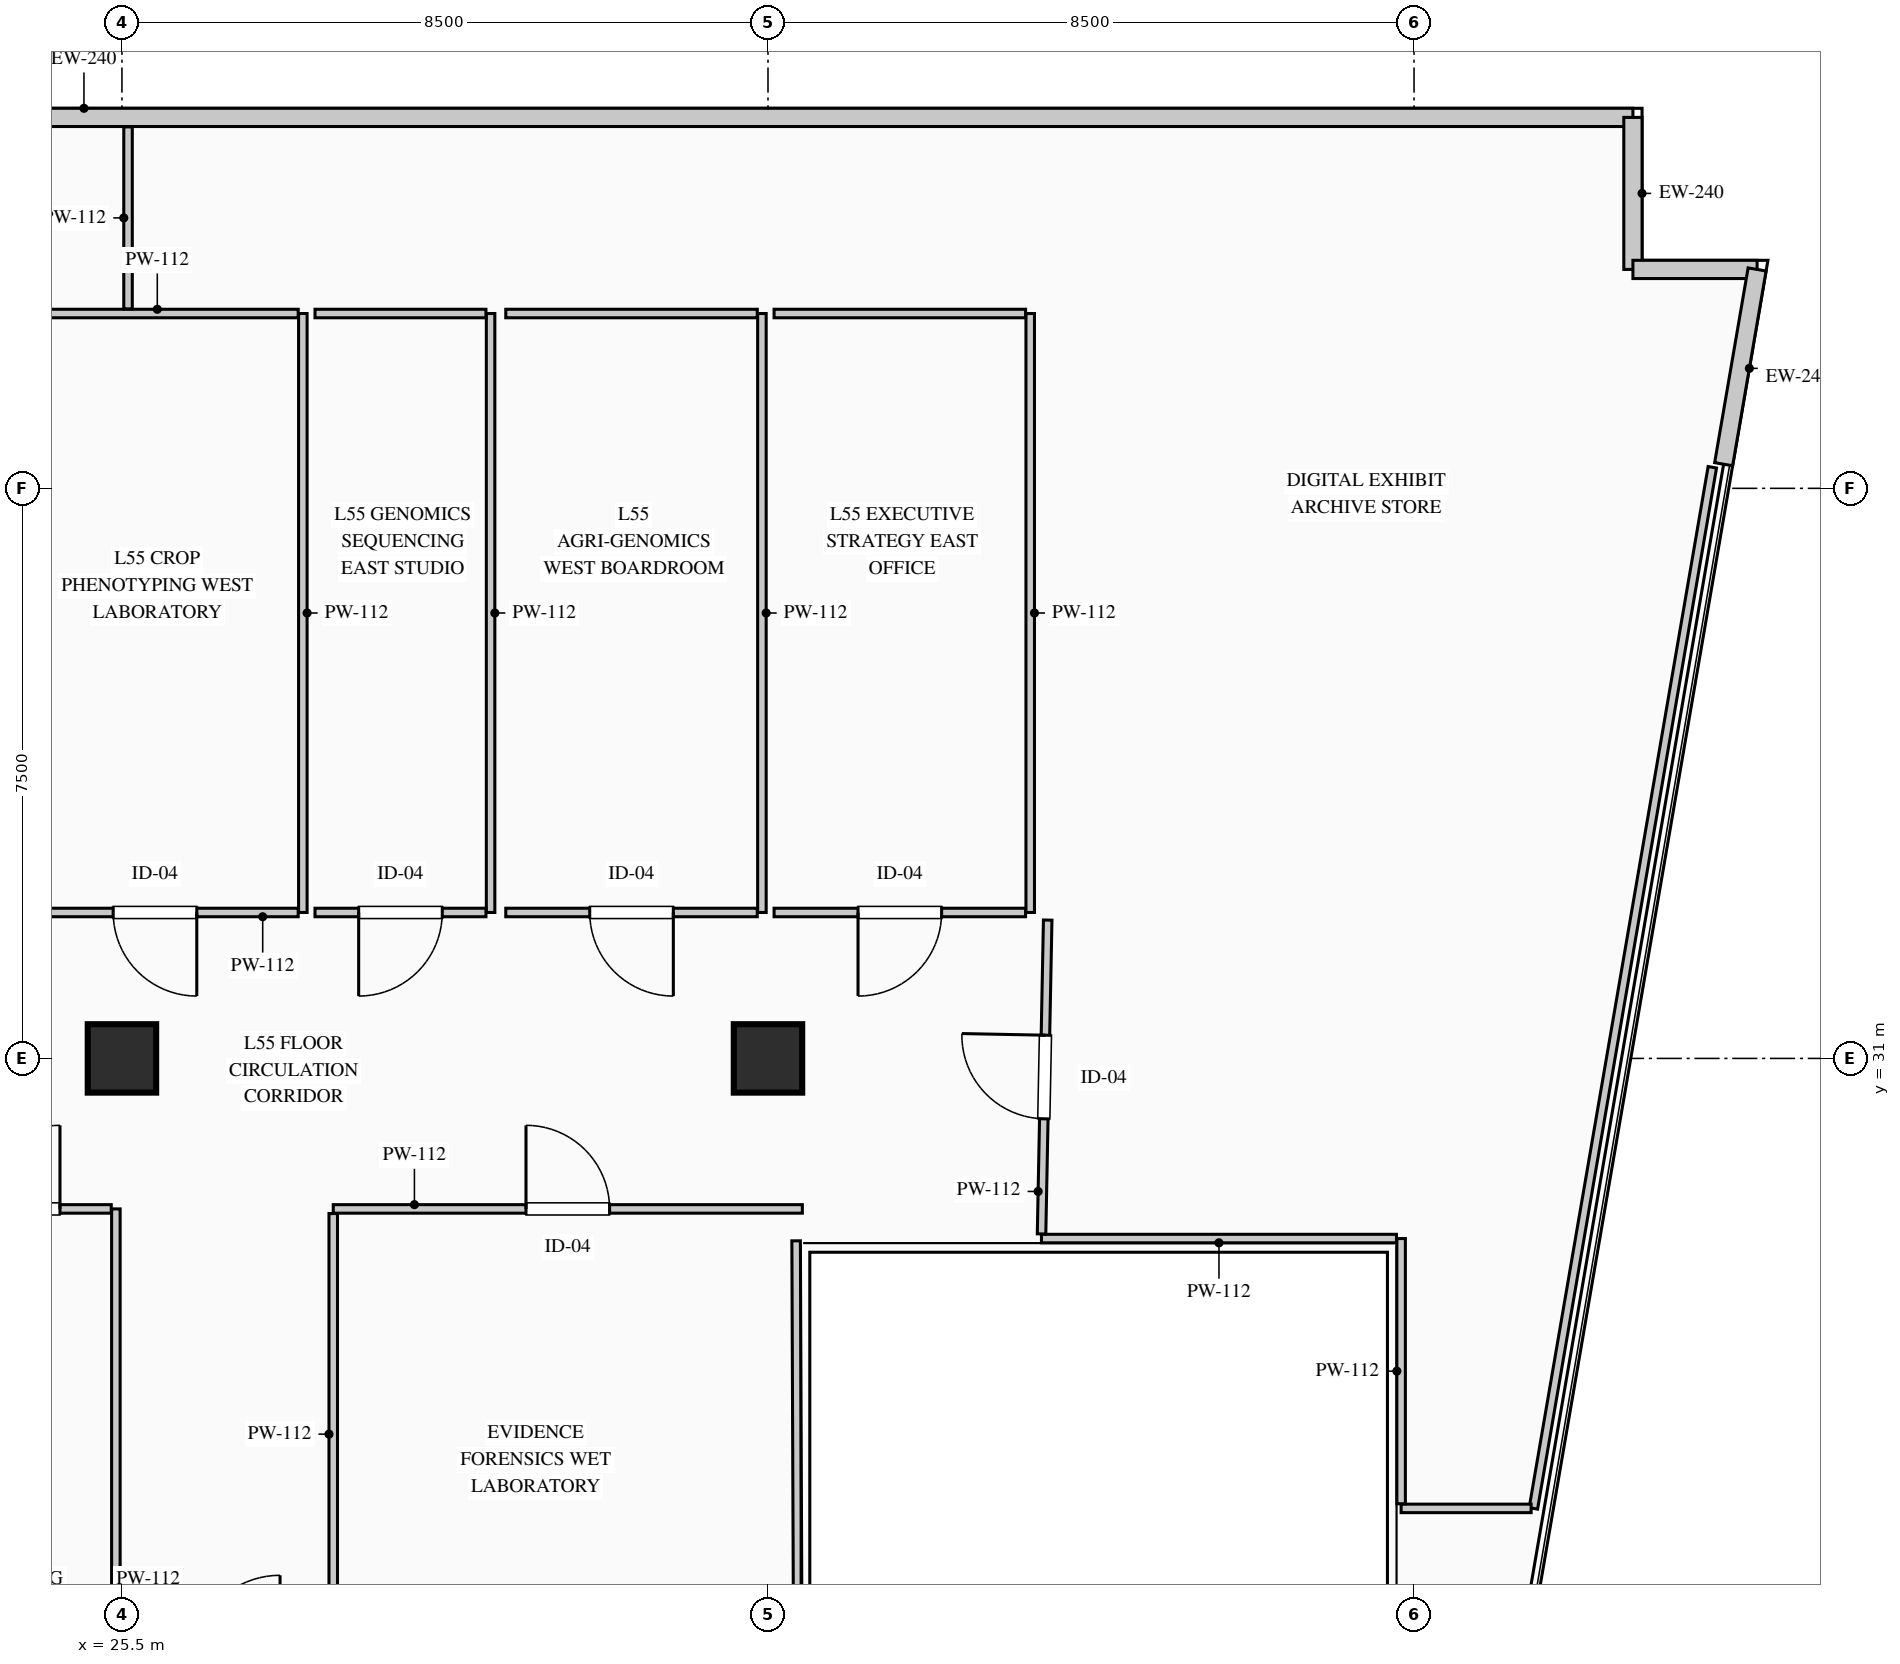
"""IFC4 building model, lengths in metres.
Left out: names, types, materials, properties, quantities, classifications, styles, units other than length and angle.
Written with IfcOpenShell. Run it as: python <this file> out.ifc"""

import sys

from ifc_helpers import new_model, si_unit, direction, frame, frame_2d, origin, origin_2d, place, context, subcontext, project, spatial, rectangle, extrude, element, fill, save


model = new_model("IFC4")
c1 = context("Model", 3, precision=1e-05, world=origin(), true_north=direction((0.0, 1.0)))
c2 = subcontext(c1, "Body", "Model", "MODEL_VIEW")
j1 = project(units=[si_unit("LENGTHUNIT", "METRE"), si_unit("PLANEANGLEUNIT", "RADIAN")], contexts=[c1])
p1 = place(None, origin())
s1 = spatial("IfcSite", under=j1, at=p1, CompositionType="ELEMENT")
p2 = place(p1, origin())
s2 = spatial("IfcBuilding", under=s1, at=p2, CompositionType="ELEMENT")
p3 = place(p2, frame((0.0, 0.0, 231.15)))
s3 = spatial("IfcBuildingStorey", under=s2, at=p3, CompositionType="ELEMENT", Elevation=231.15)
for number, where, z_axis, x_axis in (
    (1, (25.5, 31.0, 0.0), (0.0, 0.0, 1.0), (1.0, 0.0, 0.0)),
    (2, (34.0, 31.0, 0.0), (0.0, 0.0, 1.0), (1.0, 0.0, 0.0)),
):
    element("IfcColumn", number, at=place(p3, frame(where, z_axis=z_axis, x_axis=x_axis)), inside=s3, PredefinedType="COLUMN", context=c2, shape_type="SweptSolid", body=[
        extrude(rectangle(XDim=0.9, YDim=0.9, at=origin_2d()), origin(), (0.0, 0.0, 1.0), 3.95),
    ])
p4 = place(p3, frame((4.62, 43.38, 0.0), z_axis=(0.0, 0.0, 1.0), x_axis=(1.0, 0.0, 0.0)))
e3 = element("IfcWall", 3, at=p4, inside=s3, PredefinedType="STANDARD", context=c2, shape_type="SweptSolid", body=[
    extrude(rectangle(XDim=40.76, YDim=0.24, at=frame_2d((20.38, 0.0))), origin(), (0.0, 0.0, 1.0), 3.7),
])
p5 = place(p4, frame((13.324, 0.0, 0.9)))
e4 = element("IfcOpeningElement", 4, at=p5, cuts=e3, PredefinedType="OPENING", context=c2, shape_type="SweptSolid", body=[
    extrude(rectangle(XDim=2.7, YDim=2.1, at=frame_2d((1.35, 1.05))), frame((0.0, 0.13, 0.0), z_axis=(0.0, -1.0, 0.0), x_axis=(1.0, 0.0, 0.0)), (0.0, 0.0, 1.0), 0.26),
])
p6 = place(p3, frame((45.38, 43.38, 0.0), z_axis=(0.0, 0.0, 1.0), x_axis=(0.0, -1.0, 0.0)))
e5 = element("IfcWall", 5, at=p6, inside=s3, PredefinedType="STANDARD", context=c2, shape_type="SweptSolid", body=[
    extrude(rectangle(XDim=2.0, YDim=0.24, at=frame_2d((1.0, 0.0))), origin(), (0.0, 0.0, 1.0), 3.7),
])
p7 = place(p3, frame((45.38, 41.38, 0.0), z_axis=(0.0, 0.0, 1.0), x_axis=(1.0, 0.0, 0.0)))
e6 = element("IfcWall", 6, at=p7, inside=s3, PredefinedType="STANDARD", context=c2, shape_type="SweptSolid", body=[
    extrude(rectangle(XDim=1.634, YDim=0.24, at=frame_2d((0.817, 0.0))), origin(), (0.0, 0.0, 1.0), 3.7),
])
p8 = place(p3, frame((47.014, 41.38, 0.0), z_axis=(0.0, 0.0, 1.0), x_axis=(-0.169406892601, -0.985546196147, 0.0)))
e7 = element("IfcWall", 7, at=p8, inside=s3, PredefinedType="STANDARD", context=c2, shape_type="SweptSolid", body=[
    extrude(rectangle(XDim=2.6, YDim=0.24, at=frame_2d((1.3, 0.0))), origin(), (0.0, 0.0, 1.0), 3.7),
])
p9 = place(p3, frame((27.88, 40.8, 0.0), z_axis=(0.0, 0.0, 1.0), x_axis=(0.0, -1.0, 0.0)))
e8 = element("IfcWall", 8, at=p9, inside=s3, PredefinedType="PARTITIONING", context=c2, shape_type="SweptSolid", body=[
    extrude(rectangle(XDim=7.88, YDim=0.112, at=frame_2d((3.94, 0.0))), origin(), (0.0, 0.0, 1.0), 3.7),
])
p10 = place(p3, frame((27.819, 32.92, 0.0), z_axis=(0.0, 0.0, 1.0), x_axis=(-1.0, 0.0, 0.0)))
e9 = element("IfcWall", 9, at=p10, inside=s3, PredefinedType="PARTITIONING", context=c2, shape_type="SweptSolid", body=[
    extrude(rectangle(XDim=3.769, YDim=0.112, at=frame_2d((1.885, 0.0))), origin(), (0.0, 0.0, 1.0), 3.7),
])
p11 = place(p10, frame((1.334, 0.0, 0.0)))
e10 = element("IfcOpeningElement", 10, at=p11, cuts=e9, PredefinedType="OPENING", context=c2, shape_type="SweptSolid", body=[
    extrude(rectangle(XDim=1.1, YDim=2.2, at=frame_2d((0.55, 1.1))), frame((0.0, 0.066, 0.0), z_axis=(0.0, -1.0, 0.0), x_axis=(1.0, 0.0, 0.0)), (0.0, 0.0, 1.0), 0.132),
])
p12 = place(p3, frame((24.111, 40.8, 0.0), z_axis=(0.0, 0.0, 1.0), x_axis=(1.0, 0.0, 0.0)))
e11 = element("IfcWall", 11, at=p12, inside=s3, PredefinedType="PARTITIONING", context=c2, shape_type="SweptSolid", body=[
    extrude(rectangle(XDim=3.708, YDim=0.112, at=frame_2d((1.854, 0.0))), origin(), (0.0, 0.0, 1.0), 3.7),
])
p13 = place(p3, frame((30.35, 40.8, 0.0), z_axis=(0.0, 0.0, 1.0), x_axis=(0.0, -1.0, 0.0)))
e12 = element("IfcWall", 12, at=p13, inside=s3, PredefinedType="PARTITIONING", context=c2, shape_type="SweptSolid", body=[
    extrude(rectangle(XDim=7.88, YDim=0.112, at=frame_2d((3.94, 0.0))), origin(), (0.0, 0.0, 1.0), 3.7),
])
p14 = place(p3, frame((30.289, 32.92, 0.0), z_axis=(0.0, 0.0, 1.0), x_axis=(-1.0, 0.0, 0.0)))
e13 = element("IfcWall", 13, at=p14, inside=s3, PredefinedType="PARTITIONING", context=c2, shape_type="SweptSolid", body=[
    extrude(rectangle(XDim=2.249, YDim=0.112, at=frame_2d((1.125, 0.0))), origin(), (0.0, 0.0, 1.0), 3.7),
])
p15 = place(p14, frame((0.574, 0.0, 0.0)))
e14 = element("IfcOpeningElement", 14, at=p15, cuts=e13, PredefinedType="OPENING", context=c2, shape_type="SweptSolid", body=[
    extrude(rectangle(XDim=1.1, YDim=2.2, at=frame_2d((0.55, 1.1))), frame((0.0, 0.066, 0.0), z_axis=(0.0, -1.0, 0.0), x_axis=(1.0, 0.0, 0.0)), (0.0, 0.0, 1.0), 0.132),
])
p16 = place(p3, frame((28.04, 40.8, 0.0), z_axis=(0.0, 0.0, 1.0), x_axis=(1.0, 0.0, 0.0)))
e15 = element("IfcWall", 15, at=p16, inside=s3, PredefinedType="PARTITIONING", context=c2, shape_type="SweptSolid", body=[
    extrude(rectangle(XDim=2.249, YDim=0.112, at=frame_2d((1.125, 0.0))), origin(), (0.0, 0.0, 1.0), 3.7),
])
p17 = place(p3, frame((33.92, 40.8, 0.0), z_axis=(0.0, 0.0, 1.0), x_axis=(0.0, -1.0, 0.0)))
e16 = element("IfcWall", 16, at=p17, inside=s3, PredefinedType="PARTITIONING", context=c2, shape_type="SweptSolid", body=[
    extrude(rectangle(XDim=7.88, YDim=0.112, at=frame_2d((3.94, 0.0))), origin(), (0.0, 0.0, 1.0), 3.7),
])
p18 = place(p3, frame((33.859, 32.92, 0.0), z_axis=(0.0, 0.0, 1.0), x_axis=(-1.0, 0.0, 0.0)))
e17 = element("IfcWall", 17, at=p18, inside=s3, PredefinedType="PARTITIONING", context=c2, shape_type="SweptSolid", body=[
    extrude(rectangle(XDim=3.309, YDim=0.112, at=frame_2d((1.654, 0.0))), origin(), (0.0, 0.0, 1.0), 3.7),
])
p19 = place(p18, frame((1.104, 0.0, 0.0)))
e18 = element("IfcOpeningElement", 18, at=p19, cuts=e17, PredefinedType="OPENING", context=c2, shape_type="SweptSolid", body=[
    extrude(rectangle(XDim=1.1, YDim=2.2, at=frame_2d((0.55, 1.1))), frame((0.0, 0.066, 0.0), z_axis=(0.0, -1.0, 0.0), x_axis=(1.0, 0.0, 0.0)), (0.0, 0.0, 1.0), 0.132),
])
p20 = place(p3, frame((30.55, 40.8, 0.0), z_axis=(0.0, 0.0, 1.0), x_axis=(1.0, 0.0, 0.0)))
e19 = element("IfcWall", 19, at=p20, inside=s3, PredefinedType="PARTITIONING", context=c2, shape_type="SweptSolid", body=[
    extrude(rectangle(XDim=3.309, YDim=0.112, at=frame_2d((1.654, 0.0))), origin(), (0.0, 0.0, 1.0), 3.7),
])
p21 = place(p3, frame((37.45, 40.8, 0.0), z_axis=(0.0, 0.0, 1.0), x_axis=(0.0, -1.0, 0.0)))
e20 = element("IfcWall", 20, at=p21, inside=s3, PredefinedType="PARTITIONING", context=c2, shape_type="SweptSolid", body=[
    extrude(rectangle(XDim=7.88, YDim=0.112, at=frame_2d((3.94, 0.0))), origin(), (0.0, 0.0, 1.0), 3.7),
])
p22 = place(p3, frame((37.389, 32.92, 0.0), z_axis=(0.0, 0.0, 1.0), x_axis=(-1.0, 0.0, 0.0)))
e21 = element("IfcWall", 21, at=p22, inside=s3, PredefinedType="PARTITIONING", context=c2, shape_type="SweptSolid", body=[
    extrude(rectangle(XDim=3.309, YDim=0.112, at=frame_2d((1.654, 0.0))), origin(), (0.0, 0.0, 1.0), 3.7),
])
p23 = place(p22, frame((1.104, 0.0, 0.0)))
e22 = element("IfcOpeningElement", 22, at=p23, cuts=e21, PredefinedType="OPENING", context=c2, shape_type="SweptSolid", body=[
    extrude(rectangle(XDim=1.1, YDim=2.2, at=frame_2d((0.55, 1.1))), frame((0.0, 0.066, 0.0), z_axis=(0.0, -1.0, 0.0), x_axis=(1.0, 0.0, 0.0)), (0.0, 0.0, 1.0), 0.132),
])
p24 = place(p3, frame((34.08, 40.8, 0.0), z_axis=(0.0, 0.0, 1.0), x_axis=(1.0, 0.0, 0.0)))
e23 = element("IfcWall", 23, at=p24, inside=s3, PredefinedType="PARTITIONING", context=c2, shape_type="SweptSolid", body=[
    extrude(rectangle(XDim=3.309, YDim=0.112, at=frame_2d((1.654, 0.0))), origin(), (0.0, 0.0, 1.0), 3.7),
])
p25 = place(p3, frame((25.42, 29.02, 0.0), z_axis=(0.0, 0.0, 1.0), x_axis=(0.0, -1.0, 0.0)))
e24 = element("IfcWall", 24, at=p25, inside=s3, PredefinedType="PARTITIONING", context=c2, shape_type="SweptSolid", body=[
    extrude(rectangle(XDim=9.74, YDim=0.112, at=frame_2d((4.87, 0.0))), origin(), (0.0, 0.0, 1.0), 2.885),
])
p26 = place(p3, frame((22.91, 29.02, 0.0), z_axis=(0.0, 0.0, 1.0), x_axis=(1.0, 0.0, 0.0)))
e25 = element("IfcWall", 25, at=p26, inside=s3, PredefinedType="PARTITIONING", context=c2, shape_type="SweptSolid", body=[
    extrude(rectangle(XDim=2.449, YDim=0.112, at=frame_2d((1.225, 0.0))), origin(), (0.0, 0.0, 1.0), 3.7),
])
p27 = place(p26, frame((0.675, 0.0, 0.0)))
e26 = element("IfcOpeningElement", 26, at=p27, cuts=e25, PredefinedType="OPENING", context=c2, shape_type="SweptSolid", body=[
    extrude(rectangle(XDim=1.1, YDim=2.2, at=frame_2d((0.55, 1.1))), frame((0.0, 0.066, 0.0), z_axis=(0.0, -1.0, 0.0), x_axis=(1.0, 0.0, 0.0)), (0.0, 0.0, 1.0), 0.132),
])
p28 = place(p3, frame((28.28, 29.02, 0.0), z_axis=(0.0, 0.0, 1.0), x_axis=(1.0, 0.0, 0.0)))
e27 = element("IfcWall", 27, at=p28, inside=s3, PredefinedType="PARTITIONING", context=c2, shape_type="SweptSolid", body=[
    extrude(rectangle(XDim=6.172, YDim=0.112, at=frame_2d((3.086, 0.0))), origin(), (0.0, 0.0, 1.0), 3.485),
])
p29 = place(p28, frame((2.536, 0.0, 0.0)))
e28 = element("IfcOpeningElement", 28, at=p29, cuts=e27, PredefinedType="OPENING", context=c2, shape_type="SweptSolid", body=[
    extrude(rectangle(XDim=1.1, YDim=2.2, at=frame_2d((0.55, 1.1))), frame((0.0, 0.066, 0.0), z_axis=(0.0, -1.0, 0.0), x_axis=(1.0, 0.0, 0.0)), (0.0, 0.0, 1.0), 0.132),
])
p30 = place(p3, frame((34.37, 28.6, 0.0), z_axis=(0.0, 0.0, 1.0), x_axis=(0.004060215387, -0.999991757292, 0.0)))
e29 = element("IfcWall", 29, at=p30, inside=s3, PredefinedType="PARTITIONING", context=c2, shape_type="SweptSolid", body=[
    extrude(rectangle(XDim=9.32, YDim=0.112, at=frame_2d((4.66, 0.0))), origin(), (0.0, 0.0, 1.0), 3.7),
])
p31 = place(p3, frame((28.28, 23.155, 0.0), z_axis=(0.0, 0.0, 1.0), x_axis=(0.0, 1.0, 0.0)))
e30 = element("IfcWall", 30, at=p31, inside=s3, PredefinedType="PARTITIONING", context=c2, shape_type="SweptSolid", body=[
    extrude(rectangle(XDim=5.804, YDim=0.112, at=frame_2d((2.902, 0.0))), origin(), (0.0, 0.0, 1.0), 3.7),
])
p32 = place(p3, frame((46.425, 38.777, 0.0), z_axis=(0.0, 0.0, 1.0), x_axis=(-0.169413343695, -0.985545087238, 0.0)))
e31 = element("IfcWall", 31, at=p32, inside=s3, PredefinedType="PARTITIONING", context=c2, shape_type="SweptSolid", body=[
    extrude(rectangle(XDim=13.898, YDim=0.112, at=frame_2d((6.949, 0.0))), origin(), (0.0, 0.0, 1.0), 3.7),
])
p33 = place(p3, frame((44.041, 25.08, 0.0), z_axis=(0.0, 0.0, 1.0), x_axis=(-1.0, 0.0, 0.0)))
e32 = element("IfcWall", 32, at=p33, inside=s3, PredefinedType="PARTITIONING", context=c2, shape_type="SweptSolid", body=[
    extrude(rectangle(XDim=1.71, YDim=0.112, at=frame_2d((0.855, 0.0))), origin(), (0.0, 0.0, 1.0), 3.7),
])
p34 = place(p3, frame((42.33, 25.141, 0.0), z_axis=(0.0, 0.0, 1.0), x_axis=(0.0, 1.0, 0.0)))
e33 = element("IfcWall", 33, at=p34, inside=s3, PredefinedType="PARTITIONING", context=c2, shape_type="SweptSolid", body=[
    extrude(rectangle(XDim=3.489, YDim=0.112, at=frame_2d((1.744, 0.0))), origin(), (0.0, 0.0, 1.0), 3.7),
])
p35 = place(p3, frame((42.269, 28.63, 0.0), z_axis=(0.0, 0.0, 1.0), x_axis=(-1.0, 0.0, 0.0)))
e34 = element("IfcWall", 34, at=p35, inside=s3, PredefinedType="PARTITIONING", context=c2, shape_type="SweptSolid", body=[
    extrude(rectangle(XDim=4.671, YDim=0.112, at=frame_2d((2.335, 0.0))), origin(), (0.0, 0.0, 1.0), 3.7),
])
p36 = place(p3, frame((37.599, 28.691, 0.0), z_axis=(0.0, 0.0, 1.0), x_axis=(0.019566997539, 0.999808547977, 0.0)))
e35 = element("IfcWall", 35, at=p36, inside=s3, PredefinedType="PARTITIONING", context=c2, shape_type="SweptSolid", body=[
    extrude(rectangle(XDim=4.13, YDim=0.112, at=frame_2d((2.065, 0.0))), origin(), (0.0, 0.0, 1.0), 3.7),
])
p37 = place(p36, frame((1.515, 0.0, 0.0)))
e36 = element("IfcOpeningElement", 36, at=p37, cuts=e35, PredefinedType="OPENING", context=c2, shape_type="SweptSolid", body=[
    extrude(rectangle(XDim=1.1, YDim=2.2, at=frame_2d((0.55, 1.1))), frame((0.0, 0.066, 0.0), z_axis=(0.0, -1.0, 0.0), x_axis=(1.0, 0.0, 0.0)), (0.0, 0.0, 1.0), 0.132),
])
p38 = place(p3, frame((25.58, 40.861, 0.0), z_axis=(0.0, 0.0, 1.0), x_axis=(0.0, 1.0, 0.0)))
e37 = element("IfcWall", 37, at=p38, inside=s3, PredefinedType="PARTITIONING", context=c2, shape_type="SweptSolid", body=[
    extrude(rectangle(XDim=2.394, YDim=0.112, at=frame_2d((1.197, 0.0))), origin(), (0.0, 0.0, 1.0), 3.7),
])
p39 = place(p11, origin())
e38 = element("IfcDoor", 38, at=p39, inside=s3, OperationType="SINGLE_SWING_LEFT", PredefinedType="DOOR", context=c2, shape_type="SweptSolid", body=[
    extrude(rectangle(XDim=1.1, YDim=2.2, at=frame_2d((0.55, 1.1))), frame((0.0, 0.025, 0.0), z_axis=(0.0, -1.0, 0.0), x_axis=(1.0, 0.0, 0.0)), (0.0, 0.0, 1.0), 0.05),
])
fill(e10, e38)
p40 = place(p15, origin())
e39 = element("IfcDoor", 39, at=p40, inside=s3, OperationType="SINGLE_SWING_RIGHT", PredefinedType="DOOR", context=c2, shape_type="SweptSolid", body=[
    extrude(rectangle(XDim=1.1, YDim=2.2, at=frame_2d((0.55, 1.1))), frame((0.0, 0.025, 0.0), z_axis=(0.0, -1.0, 0.0), x_axis=(1.0, 0.0, 0.0)), (0.0, 0.0, 1.0), 0.05),
])
fill(e14, e39)
p41 = place(p19, origin())
e40 = element("IfcDoor", 40, at=p41, inside=s3, OperationType="SINGLE_SWING_LEFT", PredefinedType="DOOR", context=c2, shape_type="SweptSolid", body=[
    extrude(rectangle(XDim=1.1, YDim=2.2, at=frame_2d((0.55, 1.1))), frame((0.0, 0.025, 0.0), z_axis=(0.0, -1.0, 0.0), x_axis=(1.0, 0.0, 0.0)), (0.0, 0.0, 1.0), 0.05),
])
fill(e18, e40)
p42 = place(p23, origin())
e41 = element("IfcDoor", 41, at=p42, inside=s3, OperationType="SINGLE_SWING_RIGHT", PredefinedType="DOOR", context=c2, shape_type="SweptSolid", body=[
    extrude(rectangle(XDim=1.1, YDim=2.2, at=frame_2d((0.55, 1.1))), frame((0.0, 0.025, 0.0), z_axis=(0.0, -1.0, 0.0), x_axis=(1.0, 0.0, 0.0)), (0.0, 0.0, 1.0), 0.05),
])
fill(e22, e41)
p43 = place(p27, origin())
e42 = element("IfcDoor", 42, at=p43, inside=s3, OperationType="SINGLE_SWING_RIGHT", PredefinedType="DOOR", context=c2, shape_type="SweptSolid", body=[
    extrude(rectangle(XDim=1.1, YDim=2.2, at=frame_2d((0.55, 1.1))), frame((0.0, 0.025, 0.0), z_axis=(0.0, -1.0, 0.0), x_axis=(1.0, 0.0, 0.0)), (0.0, 0.0, 1.0), 0.05),
])
fill(e26, e42)
p44 = place(p29, origin())
e43 = element("IfcDoor", 43, at=p44, inside=s3, OperationType="SINGLE_SWING_LEFT", PredefinedType="DOOR", context=c2, shape_type="SweptSolid", body=[
    extrude(rectangle(XDim=1.1, YDim=2.2, at=frame_2d((0.55, 1.1))), frame((0.0, 0.025, 0.0), z_axis=(0.0, -1.0, 0.0), x_axis=(1.0, 0.0, 0.0)), (0.0, 0.0, 1.0), 0.05),
])
fill(e28, e43)
p45 = place(p37, origin())
e44 = element("IfcDoor", 44, at=p45, inside=s3, OperationType="SINGLE_SWING_RIGHT", PredefinedType="DOOR", context=c2, shape_type="SweptSolid", body=[
    extrude(rectangle(XDim=1.1, YDim=2.2, at=frame_2d((0.55, 1.1))), frame((0.0, 0.025, 0.0), z_axis=(0.0, -1.0, 0.0), x_axis=(1.0, 0.0, 0.0)), (0.0, 0.0, 1.0), 0.05),
])
fill(e36, e44)
save(model, sys.argv[1])
